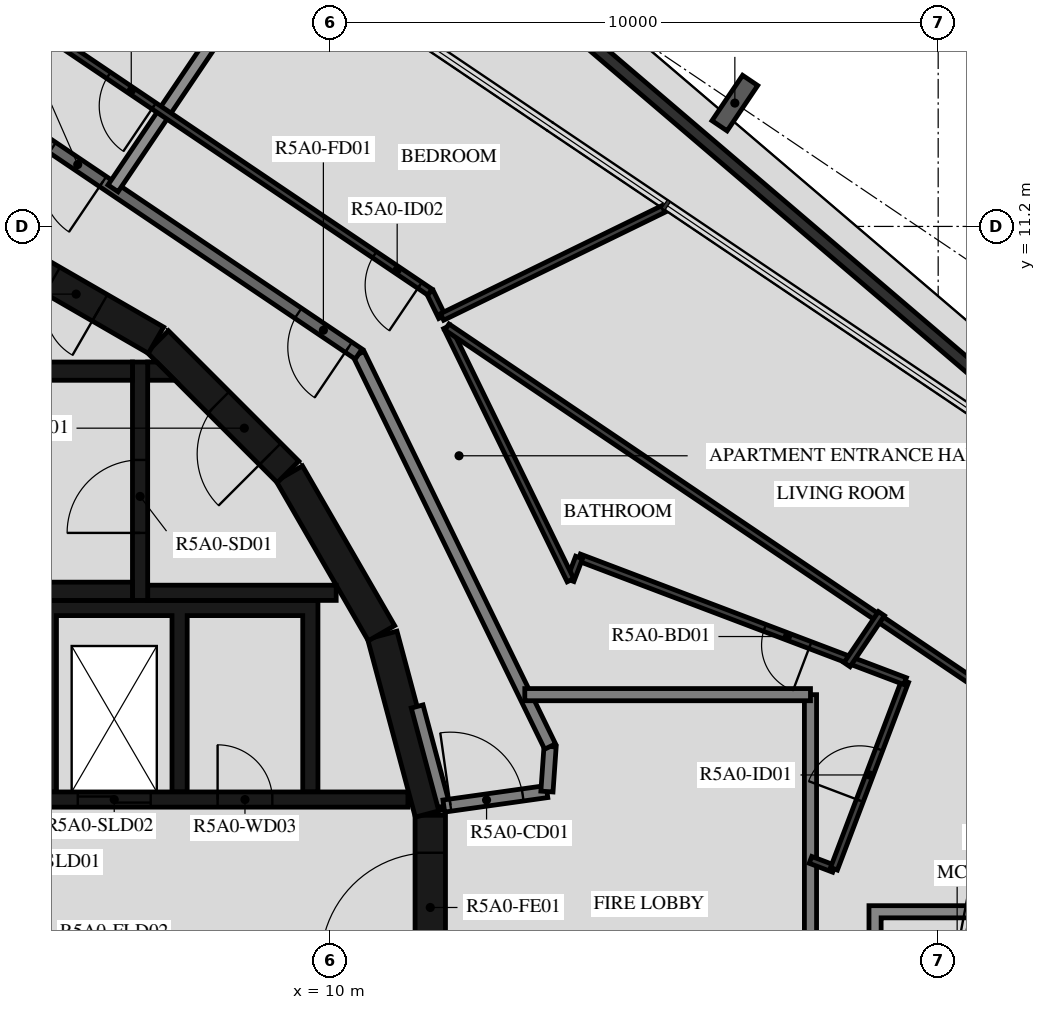
"""IFC4 building model, lengths in metres.
Left out: names, types, materials, properties, quantities, classifications, styles, units other than length and angle.
Written with IfcOpenShell. Run it as: python <this file> out.ifc"""

import sys

from ifc_helpers import new_model, si_unit, direction, frame, frame_2d, origin, origin_2d, place, context, subcontext, project, spatial, polyline, rectangle, i_section, outline, extrude, element, fill, save


model = new_model("IFC4")
c1 = context("Model", 3, precision=1e-05, world=origin(), true_north=direction((0.0, 1.0)))
c2 = subcontext(c1, "Body", "Model", "MODEL_VIEW")
j1 = project(units=[si_unit("LENGTHUNIT", "METRE"), si_unit("PLANEANGLEUNIT", "RADIAN")], contexts=[c1])
p1 = place(None, origin())
s1 = spatial("IfcSite", under=j1, at=p1, CompositionType="ELEMENT")
p2 = place(p1, origin())
s2 = spatial("IfcBuilding", under=s1, at=p2, CompositionType="ELEMENT")
p3 = place(p2, frame((0.0, 0.0, 188.4)))
s3 = spatial("IfcBuildingStorey", under=s2, at=p3, CompositionType="ELEMENT", Elevation=188.4)
p4 = place(p3, frame((16.656, 13.228, -0.45), z_axis=(0.0, 0.0, 1.0), x_axis=(0.829037661466, -0.559192771654, 0.0)))
e1 = element("IfcColumn", 1, at=p4, inside=s3, PredefinedType="COLUMN", context=c2, shape_type="SweptSolid", body=[
    extrude(i_section(OverallWidth=0.3, OverallDepth=0.9, WebThickness=0.019, FlangeThickness=0.035, FilletRadius=0.03, at=origin_2d()), origin(), (0.0, 0.0, 1.0), 3.57),
])
p5 = place(p3, frame((-0.808, 27.101, 0.03), z_axis=(0.0, 0.0, 1.0), x_axis=(0.76040780846, -0.649445890613, 0.0)))
e2 = element("IfcWall", 2, at=p5, inside=s3, PredefinedType="PARAPET", context=c2, shape_type="SweptSolid", body=[
    extrude(rectangle(XDim=36.429, YDim=0.2, at=frame_2d((18.214, 0.0))), origin(), (0.0, 0.0, 1.0), 1.5),
])
p6 = place(p3, frame((11.647, -1.516, 0.0), z_axis=(0.0, 0.0, 1.0), x_axis=(0.0, 1.0, 0.0)))
e3 = element("IfcWall", 3, at=p6, inside=s3, PredefinedType="SHEAR", context=c2, shape_type="SweptSolid", body=[
    extrude(rectangle(XDim=3.033, YDim=0.5, at=frame_2d((1.516, 0.0))), origin(), (0.0, 0.0, 1.0), 3.12),
])
p7 = place(p6, frame((0.616, 0.0, 0.0)))
e4 = element("IfcOpeningElement", 4, at=p7, cuts=e3, PredefinedType="OPENING", context=c2, shape_type="SweptSolid", body=[
    extrude(rectangle(XDim=1.8, YDim=2.1, at=frame_2d((0.9, 1.05))), frame((0.0, 0.26, 0.0), z_axis=(0.0, -1.0, 0.0), x_axis=(1.0, 0.0, 0.0)), (0.0, 0.0, 1.0), 0.52),
])
for number, where, z_axis, x_axis in (
    (5, (11.643, 1.55, 0.0), (0.0, 0.0, 1.0), (-0.259, 0.966, 0.0)),
    (6, (10.845, 4.51, 0.0), (0.0, 0.0, 1.0), (-0.5, 0.866, 0.0)),
):
    element("IfcWall", number, at=place(p3, frame(where, z_axis=z_axis, x_axis=x_axis)), inside=s3, PredefinedType="SHEAR", context=c2, shape_type="SweptSolid", body=[
        extrude(rectangle(XDim=3.033, YDim=0.5, at=frame_2d((1.516, 0.0))), origin(), (0.0, 0.0, 1.0), 3.12),
    ])
p8 = place(p3, frame((9.308, 7.164, 0.0), z_axis=(0.0, 0.0, 1.0), x_axis=(-0.707106781187, 0.707106781187, 0.0)))
e7 = element("IfcWall", 7, at=p8, inside=s3, PredefinedType="SHEAR", context=c2, shape_type="SweptSolid", body=[
    extrude(rectangle(XDim=3.032, YDim=0.5, at=frame_2d((1.516, 0.0))), origin(), (0.0, 0.0, 1.0), 3.12),
])
p9 = place(p8, frame((0.416, 0.0, 0.0)))
e8 = element("IfcOpeningElement", 8, at=p9, cuts=e7, PredefinedType="OPENING", context=c2, shape_type="SweptSolid", body=[
    extrude(rectangle(XDim=1.2, YDim=2.1, at=frame_2d((0.6, 1.05))), frame((0.0, 0.26, 0.0), z_axis=(0.0, -1.0, 0.0), x_axis=(1.0, 0.0, 0.0)), (0.0, 0.0, 1.0), 0.52),
])
p10 = place(p3, frame((7.137, 9.329, 0.0), z_axis=(0.0, 0.0, 1.0), x_axis=(-0.865975092491, 0.500087131594, 0.0)))
e9 = element("IfcWall", 9, at=p10, inside=s3, PredefinedType="SHEAR", context=c2, shape_type="SweptSolid", body=[
    extrude(rectangle(XDim=3.033, YDim=0.5, at=frame_2d((1.516, 0.0))), origin(), (0.0, 0.0, 1.0), 3.12),
])
p11 = place(p10, frame((1.066, 0.0, 0.0)))
e10 = element("IfcOpeningElement", 10, at=p11, cuts=e9, PredefinedType="OPENING", context=c2, shape_type="SweptSolid", body=[
    extrude(rectangle(XDim=0.9, YDim=2.1, at=frame_2d((0.45, 1.05))), frame((0.0, 0.26, 0.0), z_axis=(0.0, -1.0, 0.0), x_axis=(1.0, 0.0, 0.0)), (0.0, 0.0, 1.0), 0.52),
])
for number, where, z_axis, x_axis in (
    (11, (0.0, 5.2, 0.0), (0.0, 0.0, 1.0), (1.0, 0.0, 0.0)),
    (12, (0.0, 8.82, 0.0), (0.0, 0.0, 1.0), (1.0, 0.0, 0.0)),
):
    element("IfcWall", number, at=place(p3, frame(where, z_axis=z_axis, x_axis=x_axis)), inside=s3, PredefinedType="SHEAR", context=c2, shape_type="SweptSolid", body=[
        extrude(rectangle(XDim=6.75, YDim=0.3, at=frame_2d((3.375, 0.0))), origin(), (0.0, 0.0, 1.0), 3.12),
    ])
p12 = place(p3, frame((6.875, 5.05, 0.0), z_axis=(0.0, 0.0, 1.0), x_axis=(0.0, 1.0, 0.0)))
e13 = element("IfcWall", 13, at=p12, inside=s3, PredefinedType="SHEAR", context=c2, shape_type="SweptSolid", body=[
    extrude(rectangle(XDim=3.92, YDim=0.25, at=frame_2d((1.96, 0.0))), origin(), (0.0, 0.0, 1.0), 3.12),
])
p13 = place(p12, frame((1.11, 0.0, 0.0)))
e14 = element("IfcOpeningElement", 14, at=p13, cuts=e13, PredefinedType="OPENING", context=c2, shape_type="SweptSolid", body=[
    extrude(rectangle(XDim=1.2, YDim=2.1, at=frame_2d((0.6, 1.05))), frame((0.0, 0.135, 0.0), z_axis=(0.0, -1.0, 0.0), x_axis=(1.0, 0.0, 0.0)), (0.0, 0.0, 1.0), 0.27),
])
p14 = place(p3, frame((7.0, 5.175, 0.0), z_axis=(0.0, 0.0, 1.0), x_axis=(1.0, 0.0, 0.0)))
e15 = element("IfcWall", 15, at=p14, inside=s3, PredefinedType="SHEAR", context=c2, shape_type="SweptSolid", body=[
    extrude(rectangle(XDim=3.1, YDim=0.25, at=frame_2d((1.55, 0.0))), origin(), (0.0, 0.0, 1.0), 3.12),
])
p15 = place(p3, origin())
e16 = element("IfcWall", 16, at=p15, inside=s3, PredefinedType="SHEAR", context=c2, shape_type="SweptSolid", body=[
    extrude(outline(polyline([(7.448, 8.67), (7.0, 8.67), (7.0, 8.97), (7.148, 8.97), (7.448, 8.67)])), origin(), (0.0, 0.0, 1.0), 3.12),
])
p16 = place(p3, origin())
e17 = element("IfcWall", 17, at=p16, inside=s3, PredefinedType="SHEAR", context=c2, shape_type="SweptSolid", body=[
    extrude(outline(polyline([(-9.55, 4.8), (-5.5, 4.8), (-5.5, 1.9), (-5.25, 1.9), (-5.25, 4.8), (-1.2, 4.8), (-1.2, 1.9), (-0.95, 1.9), (-0.95, 4.8), (0.95, 4.8), (0.95, 1.9), (1.2, 1.9), (1.2, 4.8), (3.1, 4.8), (3.1, 1.9), (3.35, 1.9), (3.35, 4.8), (5.25, 4.8), (5.25, 1.9), (5.5, 1.9), (5.5, 4.8), (7.4, 4.8), (7.4, 1.9), (7.65, 1.9), (7.65, 4.8), (9.55, 4.8), (9.55, 1.9), (9.8, 1.9), (9.8, 4.8), (9.8, 5.05), (-9.8, 5.05), (-9.8, 4.8), (-9.8, 1.9), (-9.55, 1.9), (-9.55, 4.8)])), origin(), (0.0, 0.0, 1.0), 3.12),
])
p17 = place(p3, frame((3.35, 1.775, 0.0), z_axis=(0.0, 0.0, 1.0), x_axis=(1.0, 0.0, 0.0)))
e18 = element("IfcWall", 18, at=p17, inside=s3, PredefinedType="SHEAR", context=c2, shape_type="SweptSolid", body=[
    extrude(rectangle(XDim=7.93, YDim=0.25, at=frame_2d((3.965, 0.0))), origin(), (0.0, 0.0, 1.0), 3.12),
])
p18 = place(p17, frame((0.35, 0.0, 0.0)))
e19 = element("IfcOpeningElement", 19, at=p18, cuts=e18, PredefinedType="OPENING", context=c2, shape_type="SweptSolid", body=[
    extrude(rectangle(XDim=1.2, YDim=2.4, at=frame_2d((0.6, 1.2))), frame((0.0, 0.135, 0.0), z_axis=(0.0, -1.0, 0.0), x_axis=(1.0, 0.0, 0.0)), (0.0, 0.0, 1.0), 0.27),
])
p19 = place(p17, frame((2.5, 0.0, 0.0)))
e20 = element("IfcOpeningElement", 20, at=p19, cuts=e18, PredefinedType="OPENING", context=c2, shape_type="SweptSolid", body=[
    extrude(rectangle(XDim=1.2, YDim=2.4, at=frame_2d((0.6, 1.2))), frame((0.0, 0.135, 0.0), z_axis=(0.0, -1.0, 0.0), x_axis=(1.0, 0.0, 0.0)), (0.0, 0.0, 1.0), 0.27),
])
p20 = place(p17, frame((4.8, 0.0, 0.0)))
e21 = element("IfcOpeningElement", 21, at=p20, cuts=e18, PredefinedType="OPENING", context=c2, shape_type="SweptSolid", body=[
    extrude(rectangle(XDim=0.9, YDim=2.1, at=frame_2d((0.45, 1.05))), frame((0.0, 0.135, 0.0), z_axis=(0.0, -1.0, 0.0), x_axis=(1.0, 0.0, 0.0)), (0.0, 0.0, 1.0), 0.27),
])
p21 = place(p3, frame((11.87, 1.668, 0.0), z_axis=(0.0, 0.0, 1.0), x_axis=(-0.258836880648, 0.965921047093, 0.0)))
e22 = element("IfcWall", 22, at=p21, inside=s3, PredefinedType="STANDARD", context=c2, shape_type="SweptSolid", body=[
    extrude(rectangle(XDim=1.695, YDim=0.2, at=frame_2d((0.848, 0.0))), origin(), (0.0, 0.0, 1.0), 3.12),
])
p22 = place(p3, frame((11.87, 1.668, 0.0), z_axis=(0.0, 0.0, 1.0), x_axis=(0.990271931984, 0.139145609792, 0.0)))
e23 = element("IfcWall", 23, at=p22, inside=s3, PredefinedType="STANDARD", context=c2, shape_type="SweptSolid", body=[
    extrude(rectangle(XDim=1.712, YDim=0.2, at=frame_2d((0.856, 0.0))), origin(), (0.0, 0.0, 1.0), 3.12),
])
p23 = place(p22, frame((0.11, 0.0, 0.0)))
e24 = element("IfcOpeningElement", 24, at=p23, cuts=e23, PredefinedType="OPENING", context=c2, shape_type="SweptSolid", body=[
    extrude(rectangle(XDim=1.2, YDim=2.1, at=frame_2d((0.6, 1.05))), frame((0.0, 0.11, 0.0), z_axis=(0.0, -1.0, 0.0), x_axis=(1.0, 0.0, 0.0)), (0.0, 0.0, 1.0), 0.22),
])
p24 = place(p3, frame((13.566, 1.906, 0.0), z_axis=(0.0, 0.0, 1.0), x_axis=(0.07005495793, 0.997543133338, 0.0)))
e25 = element("IfcWall", 25, at=p24, inside=s3, PredefinedType="STANDARD", context=c2, shape_type="SweptSolid", body=[
    extrude(rectangle(XDim=0.742, YDim=0.2, at=frame_2d((0.371, 0.0))), origin(), (0.0, 0.0, 1.0), 3.12),
])
p25 = place(p3, frame((13.618, 2.647, 0.0), z_axis=(0.0, 0.0, 1.0), x_axis=(-0.438366026218, 0.898796543751, 0.0)))
e26 = element("IfcWall", 26, at=p25, inside=s3, PredefinedType="STANDARD", context=c2, shape_type="SweptSolid", body=[
    extrude(rectangle(XDim=7.181, YDim=0.2, at=frame_2d((3.591, 0.0))), origin(), (0.0, 0.0, 1.0), 3.12),
])
p26 = place(p3, frame((10.47, 9.101, 0.0), z_axis=(0.0, 0.0, 1.0), x_axis=(-0.829035841718, 0.559195469534, 0.0)))
e27 = element("IfcWall", 27, at=p26, inside=s3, PredefinedType="STANDARD", context=c2, shape_type="SweptSolid", body=[
    extrude(rectangle(XDim=7.181, YDim=0.2, at=frame_2d((3.591, 0.0))), origin(), (0.0, 0.0, 1.0), 3.12),
])
p27 = place(p26, frame((0.2, 0.0, 0.0)))
e28 = element("IfcOpeningElement", 28, at=p27, cuts=e27, PredefinedType="OPENING", context=c2, shape_type="SweptSolid", body=[
    extrude(rectangle(XDim=1.0, YDim=2.1, at=frame_2d((0.5, 1.05))), frame((0.0, 0.11, 0.0), z_axis=(0.0, -1.0, 0.0), x_axis=(1.0, 0.0, 0.0)), (0.0, 0.0, 1.0), 0.22),
])
p28 = place(p26, frame((5.073, 0.0, 0.0)))
e29 = element("IfcOpeningElement", 29, at=p28, cuts=e27, PredefinedType="OPENING", context=c2, shape_type="SweptSolid", body=[
    extrude(rectangle(XDim=1.0, YDim=2.1, at=frame_2d((0.5, 1.05))), frame((0.0, 0.11, 0.0), z_axis=(0.0, -1.0, 0.0), x_axis=(1.0, 0.0, 0.0)), (0.0, 0.0, 1.0), 0.22),
])
p29 = place(p3, frame((17.9, -3.5, 0.0), z_axis=(0.0, 0.0, 1.0), x_axis=(0.0, 1.0, 0.0)))
e30 = element("IfcWall", 30, at=p29, inside=s3, PredefinedType="STANDARD", context=c2, shape_type="SweptSolid", body=[
    extrude(rectangle(XDim=7.0, YDim=0.2, at=frame_2d((3.5, 0.0))), origin(), (0.0, 0.0, 1.0), 3.12),
])
p30 = place(p3, frame((17.9, 3.5, 0.0), z_axis=(0.0, 0.0, 1.0), x_axis=(-1.0, 0.0, 0.0)))
e31 = element("IfcWall", 31, at=p30, inside=s3, PredefinedType="STANDARD", context=c2, shape_type="SweptSolid", body=[
    extrude(rectangle(XDim=4.698, YDim=0.2, at=frame_2d((2.349, 0.0))), origin(), (0.0, 0.0, 1.0), 3.12),
])
p31 = place(p3, frame((9.104, 15.79, 0.0), z_axis=(0.0, 0.0, 1.0), x_axis=(-0.559193912135, -0.829036892201, 0.0)))
e32 = element("IfcWall", 32, at=p31, inside=s3, PredefinedType="STANDARD", context=c2, shape_type="SweptSolid", body=[
    extrude(rectangle(XDim=4.781, YDim=0.2, at=frame_2d((2.39, 0.0))), origin(), (0.0, 0.0, 1.0), 2.73),
])
p32 = place(p3, frame((17.9, 0.783, 0.0), z_axis=(0.0, 0.0, 1.0), x_axis=(0.93513272442, -0.354297597677, 0.0)))
e33 = element("IfcWall", 33, at=p32, inside=s3, PredefinedType="PARTITIONING", context=c2, shape_type="SweptSolid", body=[
    extrude(rectangle(XDim=0.413, YDim=0.12, at=frame_2d((0.207, 0.0))), origin(), (0.0, 0.0, 1.0), 3.12),
])
p33 = place(p3, frame((18.286, 0.637, 0.0), z_axis=(0.0, 0.0, 1.0), x_axis=(0.354672075988, 0.934990758518, 0.0)))
e34 = element("IfcWall", 34, at=p33, inside=s3, PredefinedType="PARTITIONING", context=c2, shape_type="SweptSolid", body=[
    extrude(rectangle(XDim=3.3, YDim=0.12, at=frame_2d((1.65, 0.0))), origin(), (0.0, 0.0, 1.0), 3.12),
])
p34 = place(p33, frame((1.2, 0.0, 0.0)))
e35 = element("IfcOpeningElement", 35, at=p34, cuts=e34, PredefinedType="OPENING", context=c2, shape_type="SweptSolid", body=[
    extrude(rectangle(XDim=0.9, YDim=2.1, at=frame_2d((0.45, 1.05))), frame((0.0, 0.07, 0.0), z_axis=(0.0, -1.0, 0.0), x_axis=(1.0, 0.0, 0.0)), (0.0, 0.0, 1.0), 0.14),
])
p35 = place(p3, frame((19.456, 3.722, 0.0), z_axis=(0.0, 0.0, 1.0), x_axis=(-0.935017484321, 0.3546016131, 0.0)))
e36 = element("IfcWall", 36, at=p35, inside=s3, PredefinedType="PARTITIONING", context=c2, shape_type="SweptSolid", body=[
    extrude(rectangle(XDim=5.734, YDim=0.12, at=frame_2d((2.867, 0.0))), origin(), (0.0, 0.0, 1.0), 3.12),
])
p36 = place(p35, frame((1.669, 0.0, 0.0)))
e37 = element("IfcOpeningElement", 37, at=p36, cuts=e36, PredefinedType="OPENING", context=c2, shape_type="SweptSolid", body=[
    extrude(rectangle(XDim=0.8, YDim=2.1, at=frame_2d((0.4, 1.05))), frame((0.0, 0.07, 0.0), z_axis=(0.0, -1.0, 0.0), x_axis=(1.0, 0.0, 0.0)), (0.0, 0.0, 1.0), 0.14),
])
p37 = place(p3, frame((14.094, 5.756, 0.0), z_axis=(0.0, 0.0, 1.0), x_axis=(-0.354267529254, -0.935144116014, 0.0)))
e38 = element("IfcWall", 38, at=p37, inside=s3, PredefinedType="PARTITIONING", context=c2, shape_type="SweptSolid", body=[
    extrude(rectangle(XDim=0.4, YDim=0.12, at=frame_2d((0.2, 0.0))), origin(), (0.0, 0.0, 1.0), 3.12),
])
p38 = place(p3, frame((13.953, 5.382, 0.0), z_axis=(0.0, 0.0, 1.0), x_axis=(-0.438382107355, 0.898788700391, 0.0)))
e39 = element("IfcWall", 39, at=p38, inside=s3, PredefinedType="PARTITIONING", context=c2, shape_type="SweptSolid", body=[
    extrude(rectangle(XDim=4.634, YDim=0.12, at=frame_2d((2.317, 0.0))), origin(), (0.0, 0.0, 1.0), 3.12),
])
p39 = place(p3, frame((11.841, 9.712, 0.0), z_axis=(0.0, 0.0, 1.0), x_axis=(-0.438381293215, 0.898789097486, 0.0)))
e40 = element("IfcWall", 40, at=p39, inside=s3, PredefinedType="PARTITIONING", context=c2, shape_type="SweptSolid", body=[
    extrude(rectangle(XDim=0.454, YDim=0.12, at=frame_2d((0.227, 0.0))), origin(), (0.0, 0.0, 1.0), 3.12),
])
p40 = place(p3, frame((11.642, 10.12, 0.0), z_axis=(0.0, 0.0, 1.0), x_axis=(-0.829032241779, 0.55920080659, 0.0)))
e41 = element("IfcWall", 41, at=p40, inside=s3, PredefinedType="PARTITIONING", context=c2, shape_type="SweptSolid", body=[
    extrude(rectangle(XDim=7.985, YDim=0.12, at=frame_2d((3.992, 0.0))), origin(), (0.0, 0.0, 1.0), 3.12),
])
p41 = place(p40, frame((0.2, 0.0, 0.0)))
e42 = element("IfcOpeningElement", 42, at=p41, cuts=e41, PredefinedType="OPENING", context=c2, shape_type="SweptSolid", body=[
    extrude(rectangle(XDim=0.9, YDim=2.1, at=frame_2d((0.45, 1.05))), frame((0.0, 0.07, 0.0), z_axis=(0.0, -1.0, 0.0), x_axis=(1.0, 0.0, 0.0)), (0.0, 0.0, 1.0), 0.14),
])
p42 = place(p40, frame((5.475, 0.0, 0.0)))
e43 = element("IfcOpeningElement", 43, at=p42, cuts=e41, PredefinedType="OPENING", context=c2, shape_type="SweptSolid", body=[
    extrude(rectangle(XDim=0.9, YDim=2.1, at=frame_2d((0.45, 1.05))), frame((0.0, 0.07, 0.0), z_axis=(0.0, -1.0, 0.0), x_axis=(1.0, 0.0, 0.0)), (0.0, 0.0, 1.0), 0.14),
])
p43 = place(p3, frame((22.598, 2.345, 0.0), z_axis=(0.0, 0.0, 1.0), x_axis=(-0.829034113947, 0.559198031034, 0.0)))
e44 = element("IfcWall", 44, at=p43, inside=s3, PredefinedType="PARTITIONING", context=c2, shape_type="SweptSolid", body=[
    extrude(rectangle(XDim=12.879, YDim=0.12, at=frame_2d((6.439, 0.0))), origin(), (0.0, 0.0, 1.0), 3.12),
])
p44 = place(p43, frame((0.2, 0.0, 0.0)))
e45 = element("IfcOpeningElement", 45, at=p44, cuts=e44, PredefinedType="OPENING", context=c2, shape_type="SweptSolid", body=[
    extrude(rectangle(XDim=0.9, YDim=2.1, at=frame_2d((0.45, 1.05))), frame((0.0, 0.07, 0.0), z_axis=(0.0, -1.0, 0.0), x_axis=(1.0, 0.0, 0.0)), (0.0, 0.0, 1.0), 0.14),
])
p45 = place(p3, frame((19.067, 4.832, 0.0), z_axis=(0.0, 0.0, 1.0), x_axis=(-0.559257363459, -0.828994090098, 0.0)))
e46 = element("IfcWall", 46, at=p45, inside=s3, PredefinedType="PARTITIONING", context=c2, shape_type="SweptSolid", body=[
    extrude(rectangle(XDim=1.012, YDim=0.12, at=frame_2d((0.506, 0.0))), origin(), (0.0, 0.0, 1.0), 3.12),
])
p46 = place(p3, frame((15.482, 11.487, 0.0), z_axis=(0.0, 0.0, 1.0), x_axis=(-0.898807251285, -0.438344071521, 0.0)))
e47 = element("IfcWall", 47, at=p46, inside=s3, PredefinedType="PARTITIONING", context=c2, shape_type="SweptSolid", body=[
    extrude(rectangle(XDim=4.051, YDim=0.12, at=frame_2d((2.025, 0.0))), origin(), (0.0, 0.0, 1.0), 3.12),
])
p47 = place(p3, origin())
e48 = element("IfcWall", 48, at=p47, inside=s3, PredefinedType="STANDARD", context=c2, shape_type="SweptSolid", body=[
    extrude(outline(polyline([(21.762, 0.03), (21.762, -2.87), (18.862, -2.87), (18.862, 0.03), (21.762, 0.03)]), holes=[polyline([(19.062, -2.67), (21.562, -2.67), (21.562, -0.17), (19.062, -0.17), (19.062, -2.67)])]), origin(), (0.0, 0.0, 1.0), 3.12),
])
p48 = place(p13, origin())
e49 = element("IfcDoor", 49, at=p48, inside=s3, OperationType="SINGLE_SWING_LEFT", PredefinedType="DOOR", context=c2, shape_type="SweptSolid", body=[
    extrude(rectangle(XDim=1.2, YDim=2.1, at=frame_2d((0.6, 1.05))), frame((0.0, 0.025, 0.0), z_axis=(0.0, -1.0, 0.0), x_axis=(1.0, 0.0, 0.0)), (0.0, 0.0, 1.0), 0.05),
])
fill(e14, e49)
p49 = place(p9, origin())
e50 = element("IfcDoor", 50, at=p49, inside=s3, OperationType="SINGLE_SWING_RIGHT", PredefinedType="DOOR", context=c2, shape_type="SweptSolid", body=[
    extrude(rectangle(XDim=1.2, YDim=2.1, at=frame_2d((0.6, 1.05))), frame((0.0, 0.025, 0.0), z_axis=(0.0, -1.0, 0.0), x_axis=(1.0, 0.0, 0.0)), (0.0, 0.0, 1.0), 0.05),
])
fill(e8, e50)
p50 = place(p7, origin())
e51 = element("IfcDoor", 51, at=p50, inside=s3, OperationType="DOUBLE_DOOR_SINGLE_SWING", PredefinedType="DOOR", context=c2, shape_type="SweptSolid", body=[
    extrude(rectangle(XDim=1.8, YDim=2.1, at=frame_2d((0.9, 1.05))), frame((0.0, 0.025, 0.0), z_axis=(0.0, -1.0, 0.0), x_axis=(1.0, 0.0, 0.0)), (0.0, 0.0, 1.0), 0.05),
])
fill(e4, e51)
p51 = place(p19, origin())
e52 = element("IfcDoor", 52, at=p51, inside=s3, OperationType="DOUBLE_DOOR_SLIDING", PredefinedType="DOOR", context=c2, shape_type="SweptSolid", body=[
    extrude(rectangle(XDim=1.2, YDim=2.4, at=frame_2d((0.6, 1.2))), frame((0.0, 0.025, 0.0), z_axis=(0.0, -1.0, 0.0), x_axis=(1.0, 0.0, 0.0)), (0.0, 0.0, 1.0), 0.05),
])
fill(e20, e52)
p52 = place(p20, origin())
e53 = element("IfcDoor", 53, at=p52, inside=s3, OperationType="SINGLE_SWING_LEFT", PredefinedType="DOOR", context=c2, shape_type="SweptSolid", body=[
    extrude(rectangle(XDim=0.9, YDim=2.1, at=frame_2d((0.45, 1.05))), frame((0.0, 0.025, 0.0), z_axis=(0.0, -1.0, 0.0), x_axis=(1.0, 0.0, 0.0)), (0.0, 0.0, 1.0), 0.05),
])
fill(e21, e53)
p53 = place(p11, origin())
e54 = element("IfcDoor", 54, at=p53, inside=s3, OperationType="SINGLE_SWING_RIGHT", PredefinedType="DOOR", context=c2, shape_type="SweptSolid", body=[
    extrude(rectangle(XDim=0.9, YDim=2.1, at=frame_2d((0.45, 1.05))), frame((0.0, 0.025, 0.0), z_axis=(0.0, -1.0, 0.0), x_axis=(1.0, 0.0, 0.0)), (0.0, 0.0, 1.0), 0.05),
])
fill(e10, e54)
p54 = place(p27, origin())
e55 = element("IfcDoor", 55, at=p54, inside=s3, OperationType="SINGLE_SWING_LEFT", PredefinedType="DOOR", context=c2, shape_type="SweptSolid", body=[
    extrude(rectangle(XDim=1.0, YDim=2.1, at=frame_2d((0.5, 1.05))), frame((0.0, 0.025, 0.0), z_axis=(0.0, -1.0, 0.0), x_axis=(1.0, 0.0, 0.0)), (0.0, 0.0, 1.0), 0.05),
])
fill(e28, e55)
p55 = place(p34, origin())
e56 = element("IfcDoor", 56, at=p55, inside=s3, OperationType="SINGLE_SWING_LEFT", PredefinedType="DOOR", context=c2, shape_type="SweptSolid", body=[
    extrude(rectangle(XDim=0.9, YDim=2.1, at=frame_2d((0.45, 1.05))), frame((0.0, 0.025, 0.0), z_axis=(0.0, -1.0, 0.0), x_axis=(1.0, 0.0, 0.0)), (0.0, 0.0, 1.0), 0.05),
])
fill(e35, e56)
p56 = place(p36, origin())
e57 = element("IfcDoor", 57, at=p56, inside=s3, OperationType="SINGLE_SWING_LEFT", PredefinedType="DOOR", context=c2, shape_type="SweptSolid", body=[
    extrude(rectangle(XDim=0.8, YDim=2.1, at=frame_2d((0.4, 1.05))), frame((0.0, 0.025, 0.0), z_axis=(0.0, -1.0, 0.0), x_axis=(1.0, 0.0, 0.0)), (0.0, 0.0, 1.0), 0.05),
])
fill(e37, e57)
p57 = place(p41, origin())
e58 = element("IfcDoor", 58, at=p57, inside=s3, OperationType="SINGLE_SWING_LEFT", PredefinedType="DOOR", context=c2, shape_type="SweptSolid", body=[
    extrude(rectangle(XDim=0.9, YDim=2.1, at=frame_2d((0.45, 1.05))), frame((0.0, 0.025, 0.0), z_axis=(0.0, -1.0, 0.0), x_axis=(1.0, 0.0, 0.0)), (0.0, 0.0, 1.0), 0.05),
])
fill(e42, e58)
p58 = place(p28, origin())
e59 = element("IfcDoor", 59, at=p58, inside=s3, OperationType="SINGLE_SWING_RIGHT", PredefinedType="DOOR", context=c2, shape_type="SweptSolid", body=[
    extrude(rectangle(XDim=1.0, YDim=2.1, at=frame_2d((0.5, 1.05))), frame((0.0, 0.025, 0.0), z_axis=(0.0, -1.0, 0.0), x_axis=(1.0, 0.0, 0.0)), (0.0, 0.0, 1.0), 0.05),
])
fill(e29, e59)
p59 = place(p42, origin())
e60 = element("IfcDoor", 60, at=p59, inside=s3, OperationType="SINGLE_SWING_RIGHT", PredefinedType="DOOR", context=c2, shape_type="SweptSolid", body=[
    extrude(rectangle(XDim=0.9, YDim=2.1, at=frame_2d((0.45, 1.05))), frame((0.0, 0.025, 0.0), z_axis=(0.0, -1.0, 0.0), x_axis=(1.0, 0.0, 0.0)), (0.0, 0.0, 1.0), 0.05),
])
fill(e43, e60)
p60 = place(p23, origin())
e61 = element("IfcDoor", 61, at=p60, inside=s3, OperationType="DOUBLE_DOOR_SINGLE_SWING", PredefinedType="DOOR", context=c2, shape_type="SweptSolid", body=[
    extrude(rectangle(XDim=1.2, YDim=2.1, at=frame_2d((0.6, 1.05))), frame((0.0, 0.025, 0.0), z_axis=(0.0, -1.0, 0.0), x_axis=(1.0, 0.0, 0.0)), (0.0, 0.0, 1.0), 0.05),
])
fill(e24, e61)
save(model, sys.argv[1])
